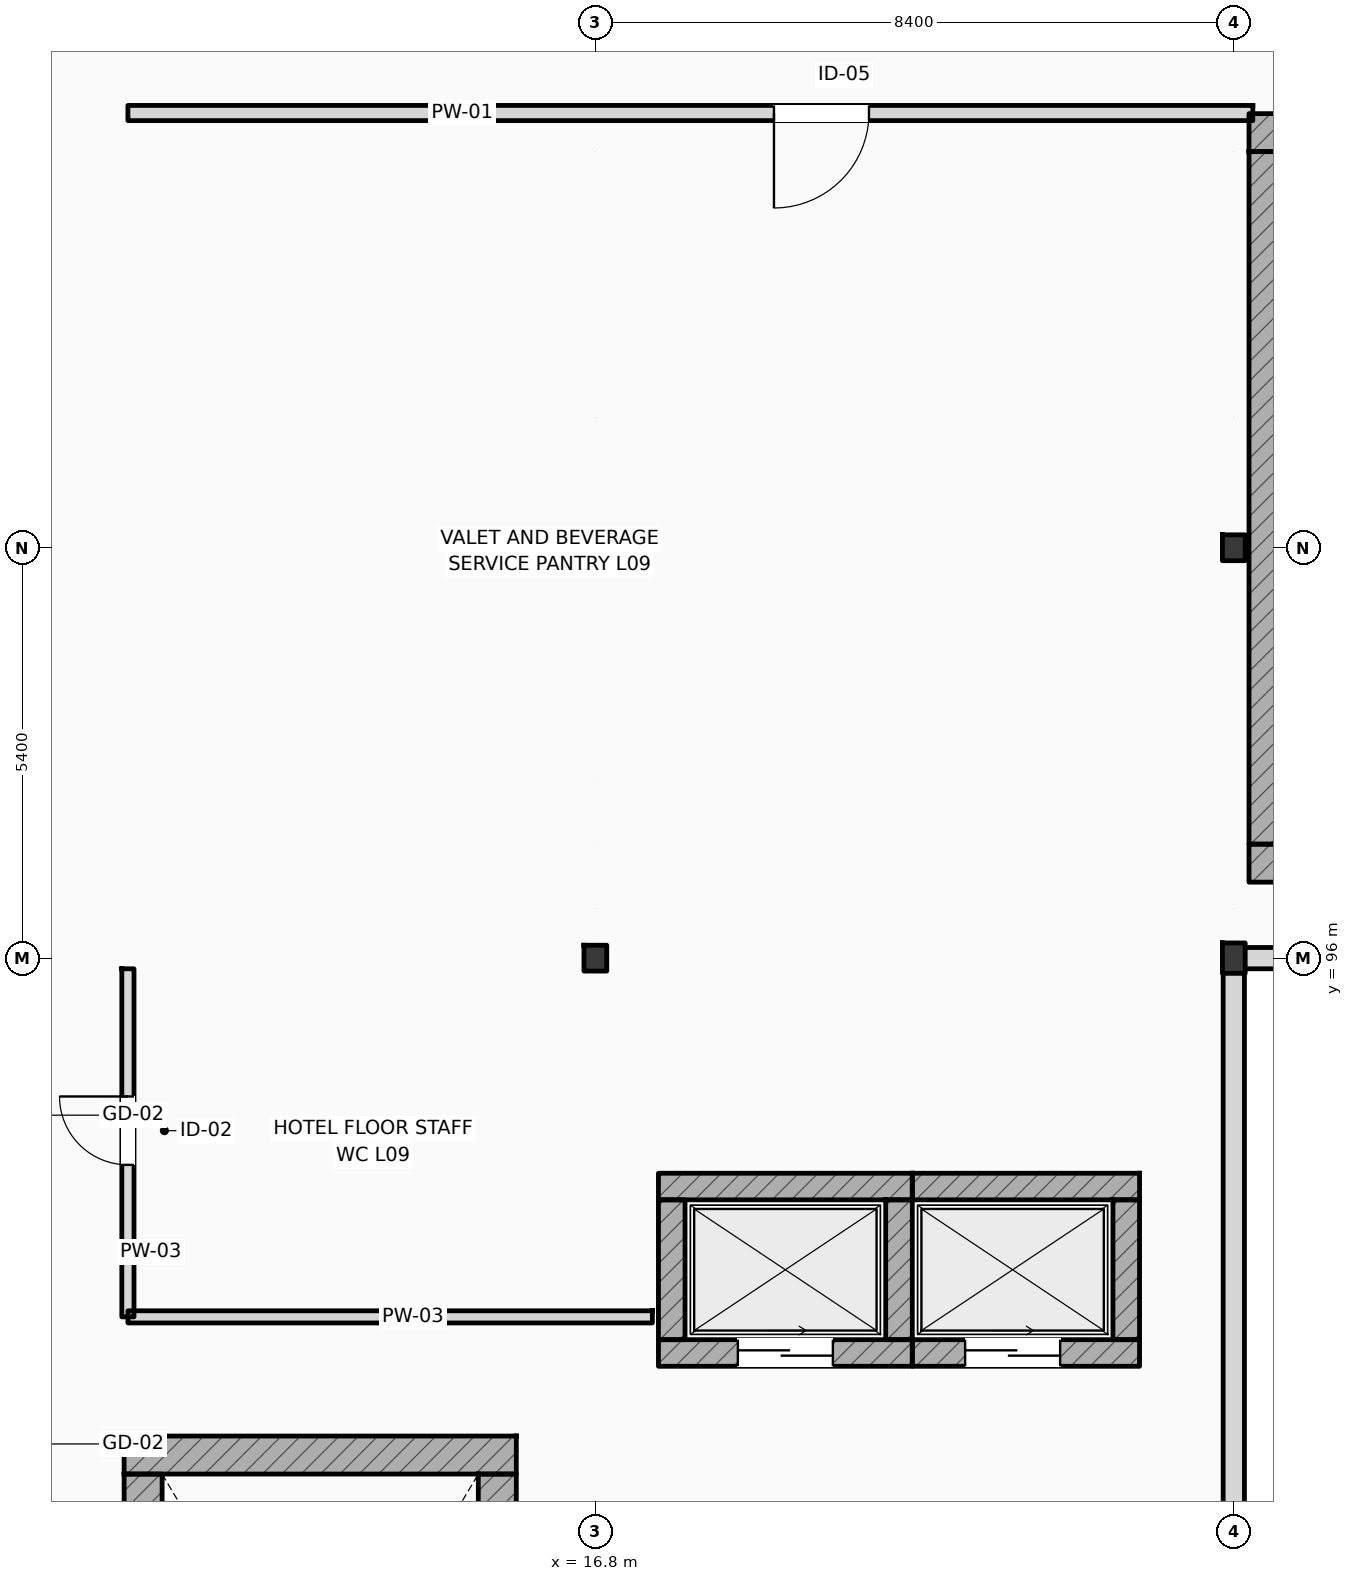
"""IFC4 building model, lengths in metres.
Left out: names, types, materials, properties, quantities, classifications, styles, units other than length and angle.
Written with IfcOpenShell. Run it as: python <this file> out.ifc"""

import sys

from ifc_helpers import new_model, si_unit, direction, frame, frame_2d, origin, origin_2d, place, context, subcontext, project, spatial, rectangle, i_section, extrude, element, fill, save


model = new_model("IFC4")
c1 = context("Model", 3, precision=1e-05, world=origin(), true_north=direction((0.0, 1.0)))
c2 = subcontext(c1, "Body", "Model", "MODEL_VIEW")
j1 = project(units=[si_unit("LENGTHUNIT", "METRE"), si_unit("PLANEANGLEUNIT", "RADIAN")], contexts=[c1])
p1 = place(None, origin())
s1 = spatial("IfcSite", under=j1, at=p1, CompositionType="ELEMENT")
p2 = place(p1, origin())
s2 = spatial("IfcBuilding", under=s1, at=p2, CompositionType="ELEMENT")
p3 = place(p2, frame((0.0, 0.0, 39.0)))
s3 = spatial("IfcBuildingStorey", under=s2, at=p3, CompositionType="ELEMENT", Elevation=39.0)
p4 = place(p3, frame((16.8, 96.0, 0.0), z_axis=(0.0, 0.0, 1.0), x_axis=(1.0, 0.0, 0.0)))
e1 = element("IfcColumn", 1, at=p4, inside=s3, PredefinedType="COLUMN", context=c2, shape_type="SweptSolid", body=[
    extrude(i_section(OverallWidth=0.3, OverallDepth=0.34, WebThickness=0.012, FlangeThickness=0.021, FilletRadius=0.027, at=origin_2d()), origin(), (0.0, 0.0, 1.0), 3.6),
])
p5 = place(p3, frame((25.2, 96.0, 0.0), z_axis=(0.0, 0.0, 1.0), x_axis=(1.0, 0.0, 0.0)))
e2 = element("IfcColumn", 2, at=p5, inside=s3, PredefinedType="COLUMN", context=c2, shape_type="SweptSolid", body=[
    extrude(i_section(OverallWidth=0.3, OverallDepth=0.4, WebThickness=0.013, FlangeThickness=0.024, FilletRadius=0.027, at=origin_2d()), origin(), (0.0, 0.0, 1.0), 3.6),
])
for number, where, z_axis, x_axis in (
    (3, (16.8, 101.4, 0.0), (0.0, 0.0, 1.0), (1.0, 0.0, 0.0)),
    (4, (25.2, 101.4, 0.0), (0.0, 0.0, 1.0), (1.0, 0.0, 0.0)),
):
    element("IfcColumn", number, at=place(p3, frame(where, z_axis=z_axis, x_axis=x_axis)), inside=s3, PredefinedType="COLUMN", context=c2, shape_type="SweptSolid", body=[
        extrude(i_section(OverallWidth=0.3, OverallDepth=0.34, WebThickness=0.012, FlangeThickness=0.021, FilletRadius=0.027, at=origin_2d()), origin(), (0.0, 0.0, 1.0), 3.6),
    ])
p6 = place(p3, frame((10.6, 89.462, 0.0), z_axis=(0.0, 0.0, 1.0), x_axis=(1.0, 0.0, 0.0)))
e5 = element("IfcWall", 5, at=p6, inside=s3, PredefinedType="SHEAR", context=c2, shape_type="SweptSolid", body=[
    extrude(rectangle(XDim=5.16, YDim=0.5, at=frame_2d((2.58, 0.0))), origin(), (0.0, 0.0, 1.0), 3.6),
])
p7 = place(p3, frame((10.85, 80.1, 0.0), z_axis=(0.0, 0.0, 1.0), x_axis=(0.0, 1.0, 0.0)))
e6 = element("IfcWall", 6, at=p7, inside=s3, PredefinedType="SHEAR", context=c2, shape_type="SweptSolid", body=[
    extrude(rectangle(XDim=9.112, YDim=0.5, at=frame_2d((4.556, 0.0))), origin(), (0.0, 0.0, 1.0), 3.6),
])
p8 = place(p3, frame((15.51, 80.1, 0.0), z_axis=(0.0, 0.0, 1.0), x_axis=(0.0, 1.0, 0.0)))
e7 = element("IfcWall", 7, at=p8, inside=s3, PredefinedType="SHEAR", context=c2, shape_type="SweptSolid", body=[
    extrude(rectangle(XDim=9.112, YDim=0.5, at=frame_2d((4.556, 0.0))), origin(), (0.0, 0.0, 1.0), 3.6),
])
p9 = place(p8, frame((0.44, 0.0, 0.0)))
e8 = element("IfcOpeningElement", 8, at=p9, cuts=e7, PredefinedType="OPENING", context=c2, shape_type="SweptSolid", body=[
    extrude(rectangle(XDim=1.1, YDim=2.2, at=frame_2d((0.55, 1.1))), frame((0.0, 0.26, 0.0), z_axis=(0.0, -1.0, 0.0), x_axis=(1.0, 0.0, 0.0)), (0.0, 0.0, 1.0), 0.52),
])
for number, where, z_axis, x_axis in (
    (9, (25.4, 106.862, 0.0), (0.0, 0.0, 1.0), (1.0, 0.0, 0.0)),
    (10, (25.4, 97.25, 0.0), (0.0, 0.0, 1.0), (1.0, 0.0, 0.0)),
):
    element("IfcWall", number, at=place(p3, frame(where, z_axis=z_axis, x_axis=x_axis)), inside=s3, PredefinedType="SHEAR", context=c2, shape_type="SweptSolid", body=[
        extrude(rectangle(XDim=5.16, YDim=0.5, at=frame_2d((2.58, 0.0))), origin(), (0.0, 0.0, 1.0), 3.6),
    ])
p10 = place(p3, frame((25.65, 97.5, 0.0), z_axis=(0.0, 0.0, 1.0), x_axis=(0.0, 1.0, 0.0)))
e11 = element("IfcWall", 11, at=p10, inside=s3, PredefinedType="SHEAR", context=c2, shape_type="SweptSolid", body=[
    extrude(rectangle(XDim=9.112, YDim=0.5, at=frame_2d((4.556, 0.0))), origin(), (0.0, 0.0, 1.0), 3.6),
])
p11 = place(p3, frame((25.2, 96.0, 0.0), z_axis=(0.0, 0.0, 1.0), x_axis=(1.0, 0.0, 0.0)))
e12 = element("IfcWall", 12, at=p11, inside=s3, PredefinedType="STANDARD", context=c2, shape_type="SweptSolid", body=[
    extrude(rectangle(XDim=70.2, YDim=0.28, at=frame_2d((35.1, 0.0))), origin(), (0.0, 0.0, 1.0), 2.92),
])
p12 = place(p11, frame((16.695, 0.0, 0.9)))
e13 = element("IfcOpeningElement", 13, at=p12, cuts=e12, PredefinedType="OPENING", context=c2, shape_type="SweptSolid", body=[
    extrude(rectangle(XDim=2.25, YDim=1.84, at=frame_2d((1.125, 0.92))), frame((0.0, 0.15, 0.0), z_axis=(0.0, -1.0, 0.0), x_axis=(1.0, 0.0, 0.0)), (0.0, 0.0, 1.0), 0.3),
])
p13 = place(p11, frame((20.748, 0.0, 0.9)))
e14 = element("IfcOpeningElement", 14, at=p13, cuts=e12, PredefinedType="OPENING", context=c2, shape_type="SweptSolid", body=[
    extrude(rectangle(XDim=1.8, YDim=1.84, at=frame_2d((0.9, 0.92))), frame((0.0, 0.15, 0.0), z_axis=(0.0, -1.0, 0.0), x_axis=(1.0, 0.0, 0.0)), (0.0, 0.0, 1.0), 0.3),
])
p14 = place(p11, frame((25.963, 0.0, 0.9)))
e15 = element("IfcOpeningElement", 15, at=p14, cuts=e12, PredefinedType="OPENING", context=c2, shape_type="SweptSolid", body=[
    extrude(rectangle(XDim=2.55, YDim=1.84, at=frame_2d((1.275, 0.92))), frame((0.0, 0.15, 0.0), z_axis=(0.0, -1.0, 0.0), x_axis=(1.0, 0.0, 0.0)), (0.0, 0.0, 1.0), 0.3),
])
p15 = place(p11, frame((32.177, 0.0, 0.9)))
e16 = element("IfcOpeningElement", 16, at=p15, cuts=e12, PredefinedType="OPENING", context=c2, shape_type="SweptSolid", body=[
    extrude(rectangle(XDim=1.35, YDim=1.84, at=frame_2d((0.675, 0.92))), frame((0.0, 0.15, 0.0), z_axis=(0.0, -1.0, 0.0), x_axis=(1.0, 0.0, 0.0)), (0.0, 0.0, 1.0), 0.3),
])
p16 = place(p11, frame((35.267, 0.0, 0.9)))
e17 = element("IfcOpeningElement", 17, at=p16, cuts=e12, PredefinedType="OPENING", context=c2, shape_type="SweptSolid", body=[
    extrude(rectangle(XDim=2.85, YDim=1.84, at=frame_2d((1.425, 0.92))), frame((0.0, 0.15, 0.0), z_axis=(0.0, -1.0, 0.0), x_axis=(1.0, 0.0, 0.0)), (0.0, 0.0, 1.0), 0.3),
])
p17 = place(p11, frame((55.56, 0.0, 0.9)))
e18 = element("IfcOpeningElement", 18, at=p17, cuts=e12, PredefinedType="OPENING", context=c2, shape_type="SweptSolid", body=[
    extrude(rectangle(XDim=1.8, YDim=1.84, at=frame_2d((0.9, 0.92))), frame((0.0, 0.15, 0.0), z_axis=(0.0, -1.0, 0.0), x_axis=(1.0, 0.0, 0.0)), (0.0, 0.0, 1.0), 0.3),
])
p18 = place(p11, frame((59.093, 0.0, 0.9)))
e19 = element("IfcOpeningElement", 19, at=p18, cuts=e12, PredefinedType="OPENING", context=c2, shape_type="SweptSolid", body=[
    extrude(rectangle(XDim=2.412, YDim=1.84, at=frame_2d((1.206, 0.92))), frame((0.0, 0.15, 0.0), z_axis=(0.0, -1.0, 0.0), x_axis=(1.0, 0.0, 0.0)), (0.0, 0.0, 1.0), 0.3),
])
p19 = place(p11, frame((63.325, 0.0, 0.9)))
e20 = element("IfcOpeningElement", 20, at=p19, cuts=e12, PredefinedType="OPENING", context=c2, shape_type="SweptSolid", body=[
    extrude(rectangle(XDim=1.8, YDim=1.84, at=frame_2d((0.9, 0.92))), frame((0.0, 0.15, 0.0), z_axis=(0.0, -1.0, 0.0), x_axis=(1.0, 0.0, 0.0)), (0.0, 0.0, 1.0), 0.3),
])
p20 = place(p11, frame((66.718, 0.0, 0.9)))
e21 = element("IfcOpeningElement", 21, at=p20, cuts=e12, PredefinedType="OPENING", context=c2, shape_type="SweptSolid", body=[
    extrude(rectangle(XDim=2.472, YDim=1.84, at=frame_2d((1.236, 0.92))), frame((0.0, 0.15, 0.0), z_axis=(0.0, -1.0, 0.0), x_axis=(1.0, 0.0, 0.0)), (0.0, 0.0, 1.0), 0.3),
])
p21 = place(p3, frame((25.2, 79.5, 0.0), z_axis=(0.0, 0.0, 1.0), x_axis=(0.0, 1.0, 0.0)))
e22 = element("IfcWall", 22, at=p21, inside=s3, PredefinedType="STANDARD", context=c2, shape_type="SweptSolid", body=[
    extrude(rectangle(XDim=16.5, YDim=0.28, at=frame_2d((8.25, 0.0))), origin(), (0.0, 0.0, 1.0), 3.01),
])
p22 = place(p3, frame((17.63, 92.995, 0.0), z_axis=(0.0, 0.0, 1.0), x_axis=(1.0, 0.0, 0.0)))
e23 = element("IfcWall", 23, at=p22, inside=s3, PredefinedType="SHEAR", context=c2, shape_type="SweptSolid", body=[
    extrude(rectangle(XDim=3.34, YDim=0.35, at=frame_2d((1.67, 0.0))), origin(), (0.0, 0.0, 1.0), 3.38),
])
p23 = place(p3, frame((17.63, 90.805, 0.0), z_axis=(0.0, 0.0, 1.0), x_axis=(1.0, 0.0, 0.0)))
e24 = element("IfcWall", 24, at=p23, inside=s3, PredefinedType="SHEAR", context=c2, shape_type="SweptSolid", body=[
    extrude(rectangle(XDim=3.34, YDim=0.35, at=frame_2d((1.67, 0.0))), origin(), (0.0, 0.0, 1.0), 3.38),
])
p24 = place(p23, frame((1.045, 0.0, 0.0)))
e25 = element("IfcOpeningElement", 25, at=p24, cuts=e24, PredefinedType="OPENING", context=c2, shape_type="SweptSolid", body=[
    extrude(rectangle(XDim=1.25, YDim=2.25, at=frame_2d((0.625, 1.125))), frame((0.0, 0.185, 0.0), z_axis=(0.0, -1.0, 0.0), x_axis=(1.0, 0.0, 0.0)), (0.0, 0.0, 1.0), 0.37),
])
for number, where, z_axis, x_axis in (
    (26, (17.805, 90.98, 0.0), (0.0, 0.0, 1.0), (0.0, 1.0, 0.0)),
    (27, (20.795, 90.98, 0.0), (0.0, 0.0, 1.0), (0.0, 1.0, 0.0)),
):
    element("IfcWall", number, at=place(p3, frame(where, z_axis=z_axis, x_axis=x_axis)), inside=s3, PredefinedType="SHEAR", context=c2, shape_type="SweptSolid", body=[
        extrude(rectangle(XDim=1.84, YDim=0.35, at=frame_2d((0.92, 0.0))), origin(), (0.0, 0.0, 1.0), 3.38),
    ])
p25 = place(p3, frame((20.97, 92.995, 0.0), z_axis=(0.0, 0.0, 1.0), x_axis=(1.0, 0.0, 0.0)))
e28 = element("IfcWall", 28, at=p25, inside=s3, PredefinedType="SHEAR", context=c2, shape_type="SweptSolid", body=[
    extrude(rectangle(XDim=2.99, YDim=0.35, at=frame_2d((1.495, 0.0))), origin(), (0.0, 0.0, 1.0), 3.38),
])
p26 = place(p3, frame((20.97, 90.805, 0.0), z_axis=(0.0, 0.0, 1.0), x_axis=(1.0, 0.0, 0.0)))
e29 = element("IfcWall", 29, at=p26, inside=s3, PredefinedType="SHEAR", context=c2, shape_type="SweptSolid", body=[
    extrude(rectangle(XDim=2.99, YDim=0.35, at=frame_2d((1.495, 0.0))), origin(), (0.0, 0.0, 1.0), 3.38),
])
p27 = place(p26, frame((0.695, 0.0, 0.0)))
e30 = element("IfcOpeningElement", 30, at=p27, cuts=e29, PredefinedType="OPENING", context=c2, shape_type="SweptSolid", body=[
    extrude(rectangle(XDim=1.25, YDim=2.25, at=frame_2d((0.625, 1.125))), frame((0.0, 0.185, 0.0), z_axis=(0.0, -1.0, 0.0), x_axis=(1.0, 0.0, 0.0)), (0.0, 0.0, 1.0), 0.37),
])
p28 = place(p3, frame((23.785, 90.98, 0.0), z_axis=(0.0, 0.0, 1.0), x_axis=(0.0, 1.0, 0.0)))
e31 = element("IfcWall", 31, at=p28, inside=s3, PredefinedType="SHEAR", context=c2, shape_type="SweptSolid", body=[
    extrude(rectangle(XDim=1.84, YDim=0.35, at=frame_2d((0.92, 0.0))), origin(), (0.0, 0.0, 1.0), 3.38),
])
p29 = place(p3, frame((10.65, 107.12, 0.0), z_axis=(0.0, 0.0, 1.0), x_axis=(1.0, 0.0, 0.0)))
e32 = element("IfcWall", 32, at=p29, inside=s3, PredefinedType="PARTITIONING", context=c2, shape_type="SweptSolid", body=[
    extrude(rectangle(XDim=14.8, YDim=0.2, at=frame_2d((7.4, 0.0))), origin(), (0.0, 0.0, 1.0), 3.38),
])
p30 = place(p29, frame((8.5, 0.0, 0.0)))
e33 = element("IfcOpeningElement", 33, at=p30, cuts=e32, PredefinedType="OPENING", context=c2, shape_type="SweptSolid", body=[
    extrude(rectangle(XDim=1.25, YDim=2.15, at=frame_2d((0.625, 1.075))), frame((0.0, 0.11, 0.0), z_axis=(0.0, -1.0, 0.0), x_axis=(1.0, 0.0, 0.0)), (0.0, 0.0, 1.0), 0.22),
])
p31 = place(p3, frame((10.65, 91.28, 0.0), z_axis=(0.0, 0.0, 1.0), x_axis=(0.0, 1.0, 0.0)))
e34 = element("IfcWall", 34, at=p31, inside=s3, PredefinedType="PARTITIONING", context=c2, shape_type="SweptSolid", body=[
    extrude(rectangle(XDim=4.58, YDim=0.16, at=frame_2d((2.29, 0.0))), origin(), (0.0, 0.0, 1.0), 3.38),
])
p32 = place(p31, frame((2.0, 0.0, 0.0)))
e35 = element("IfcOpeningElement", 35, at=p32, cuts=e34, PredefinedType="OPENING", context=c2, shape_type="SweptSolid", body=[
    extrude(rectangle(XDim=0.9, YDim=2.1, at=frame_2d((0.45, 1.05))), frame((0.0, 0.09, 0.0), z_axis=(0.0, -1.0, 0.0), x_axis=(1.0, 0.0, 0.0)), (0.0, 0.0, 1.0), 0.18),
])
p33 = place(p3, frame((10.65, 91.28, 0.0), z_axis=(0.0, 0.0, 1.0), x_axis=(1.0, 0.0, 0.0)))
e36 = element("IfcWall", 36, at=p33, inside=s3, PredefinedType="PARTITIONING", context=c2, shape_type="SweptSolid", body=[
    extrude(rectangle(XDim=6.9, YDim=0.16, at=frame_2d((3.45, 0.0))), origin(), (0.0, 0.0, 1.0), 3.38),
])
p34 = place(p24, origin())
e37 = element("IfcDoor", 37, at=p34, inside=s3, OperationType="SLIDING_TO_LEFT", PredefinedType="DOOR", context=c2, shape_type="SweptSolid", body=[
    extrude(rectangle(XDim=1.25, YDim=2.25, at=frame_2d((0.625, 1.125))), frame((0.0, 0.025, 0.0), z_axis=(0.0, -1.0, 0.0), x_axis=(1.0, 0.0, 0.0)), (0.0, 0.0, 1.0), 0.05),
])
fill(e25, e37)
p35 = place(p27, origin())
e38 = element("IfcDoor", 38, at=p35, inside=s3, OperationType="SLIDING_TO_LEFT", PredefinedType="DOOR", context=c2, shape_type="SweptSolid", body=[
    extrude(rectangle(XDim=1.25, YDim=2.25, at=frame_2d((0.625, 1.125))), frame((0.0, 0.025, 0.0), z_axis=(0.0, -1.0, 0.0), x_axis=(1.0, 0.0, 0.0)), (0.0, 0.0, 1.0), 0.05),
])
fill(e30, e38)
p36 = place(p32, origin())
e39 = element("IfcDoor", 39, at=p36, inside=s3, OperationType="SINGLE_SWING_RIGHT", PredefinedType="DOOR", context=c2, shape_type="SweptSolid", body=[
    extrude(rectangle(XDim=0.9, YDim=2.1, at=frame_2d((0.45, 1.05))), frame((0.0, 0.025, 0.0), z_axis=(0.0, -1.0, 0.0), x_axis=(1.0, 0.0, 0.0)), (0.0, 0.0, 1.0), 0.05),
])
fill(e35, e39)
p37 = place(p30, frame((1.25, 0.0, 0.0), z_axis=(0.0, 0.0, 1.0), x_axis=(-1.0, 0.0, 0.0)))
e40 = element("IfcDoor", 40, at=p37, inside=s3, OperationType="SINGLE_SWING_LEFT", PredefinedType="DOOR", context=c2, shape_type="SweptSolid", body=[
    extrude(rectangle(XDim=1.25, YDim=2.15, at=frame_2d((0.625, 1.075))), frame((0.0, 0.025, 0.0), z_axis=(0.0, -1.0, 0.0), x_axis=(1.0, 0.0, 0.0)), (0.0, 0.0, 1.0), 0.05),
])
fill(e33, e40)
save(model, sys.argv[1])
